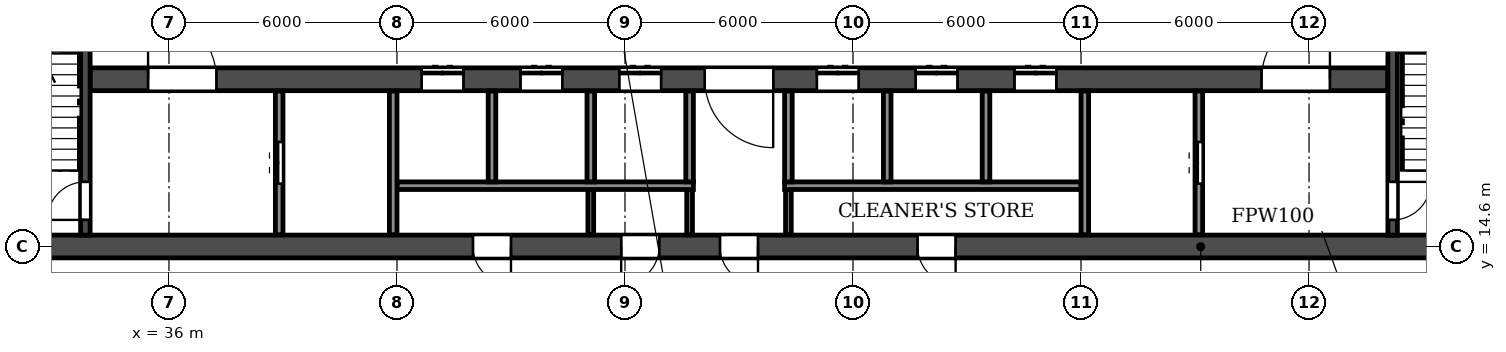
"""IFC4 building model, lengths in metres.
Left out: names, types, materials, properties, quantities, classifications, styles, units other than length and angle.
Written with IfcOpenShell. Run it as: python <this file> out.ifc"""

import sys

from ifc_helpers import new_model, si_unit, direction, frame, frame_2d, origin, place, context, subcontext, project, spatial, rectangle, extrude, element, fill, save


model = new_model("IFC4")
c1 = context("Model", 3, precision=1e-05, world=origin(), true_north=direction((0.0, 1.0)))
c2 = subcontext(c1, "Body", "Model", "MODEL_VIEW")
j1 = project(units=[si_unit("LENGTHUNIT", "METRE"), si_unit("PLANEANGLEUNIT", "RADIAN")], contexts=[c1])
p1 = place(None, origin())
s1 = spatial("IfcSite", under=j1, at=p1, CompositionType="ELEMENT")
p2 = place(p1, origin())
s2 = spatial("IfcBuilding", under=s1, at=p2, CompositionType="ELEMENT")
p3 = place(p2, frame((0.0, 0.0, 56.4)))
s3 = spatial("IfcBuildingStorey", under=s2, at=p3, CompositionType="ELEMENT", Elevation=56.4)
p4 = place(p3, frame((8.6, 14.6, 0.0), z_axis=(0.0, 0.0, 1.0), x_axis=(1.0, 0.0, 0.0)))
e1 = element("IfcWall", 1, at=p4, inside=s3, PredefinedType="SOLIDWALL", context=c2, shape_type="SweptSolid", body=[
    extrude(rectangle(XDim=84.8, YDim=0.6, at=frame_2d((42.4, 0.0))), origin(), (0.0, 0.0, 1.0), 3.05),
])
p5 = place(p4, frame((1.35, 0.0, 0.0)))
e2 = element("IfcOpeningElement", 2, at=p5, cuts=e1, PredefinedType="OPENING", context=c2, shape_type="SweptSolid", body=[
    extrude(rectangle(XDim=1.0, YDim=2.1, at=frame_2d((0.5, 1.05))), frame((0.0, 0.31, 0.0), z_axis=(0.0, -1.0, 0.0), x_axis=(1.0, 0.0, 0.0)), (0.0, 0.0, 1.0), 0.62),
])
p6 = place(p4, frame((6.05, 0.0, 0.0)))
e3 = element("IfcOpeningElement", 3, at=p6, cuts=e1, PredefinedType="OPENING", context=c2, shape_type="SweptSolid", body=[
    extrude(rectangle(XDim=1.0, YDim=2.1, at=frame_2d((0.5, 1.05))), frame((0.0, 0.31, 0.0), z_axis=(0.0, -1.0, 0.0), x_axis=(1.0, 0.0, 0.0)), (0.0, 0.0, 1.0), 0.62),
])
p7 = place(p4, frame((10.3, 0.0, 0.0)))
e4 = element("IfcOpeningElement", 4, at=p7, cuts=e1, PredefinedType="OPENING", context=c2, shape_type="SweptSolid", body=[
    extrude(rectangle(XDim=1.0, YDim=2.1, at=frame_2d((0.5, 1.05))), frame((0.0, 0.31, 0.0), z_axis=(0.0, -1.0, 0.0), x_axis=(1.0, 0.0, 0.0)), (0.0, 0.0, 1.0), 0.62),
])
p8 = place(p4, frame((18.2, 0.0, 0.0)))
e5 = element("IfcOpeningElement", 5, at=p8, cuts=e1, PredefinedType="OPENING", context=c2, shape_type="SweptSolid", body=[
    extrude(rectangle(XDim=1.0, YDim=2.1, at=frame_2d((0.5, 1.05))), frame((0.0, 0.31, 0.0), z_axis=(0.0, -1.0, 0.0), x_axis=(1.0, 0.0, 0.0)), (0.0, 0.0, 1.0), 0.62),
])
p9 = place(p4, frame((22.8, 0.0, 0.0)))
e6 = element("IfcOpeningElement", 6, at=p9, cuts=e1, PredefinedType="OPENING", context=c2, shape_type="SweptSolid", body=[
    extrude(rectangle(XDim=1.0, YDim=2.1, at=frame_2d((0.5, 1.05))), frame((0.0, 0.31, 0.0), z_axis=(0.0, -1.0, 0.0), x_axis=(1.0, 0.0, 0.0)), (0.0, 0.0, 1.0), 0.62),
])
p10 = place(p4, frame((35.4, 0.0, 0.0)))
e7 = element("IfcOpeningElement", 7, at=p10, cuts=e1, PredefinedType="OPENING", context=c2, shape_type="SweptSolid", body=[
    extrude(rectangle(XDim=1.0, YDim=2.1, at=frame_2d((0.5, 1.05))), frame((0.0, 0.31, 0.0), z_axis=(0.0, -1.0, 0.0), x_axis=(1.0, 0.0, 0.0)), (0.0, 0.0, 1.0), 0.62),
])
p11 = place(p4, frame((39.3, 0.0, 0.0)))
e8 = element("IfcOpeningElement", 8, at=p11, cuts=e1, PredefinedType="OPENING", context=c2, shape_type="SweptSolid", body=[
    extrude(rectangle(XDim=1.0, YDim=2.1, at=frame_2d((0.5, 1.05))), frame((0.0, 0.31, 0.0), z_axis=(0.0, -1.0, 0.0), x_axis=(1.0, 0.0, 0.0)), (0.0, 0.0, 1.0), 0.62),
])
p12 = place(p4, frame((41.9, 0.0, 0.0)))
e9 = element("IfcOpeningElement", 9, at=p12, cuts=e1, PredefinedType="OPENING", context=c2, shape_type="SweptSolid", body=[
    extrude(rectangle(XDim=1.0, YDim=2.1, at=frame_2d((0.5, 1.05))), frame((0.0, 0.31, 0.0), z_axis=(0.0, -1.0, 0.0), x_axis=(1.0, 0.0, 0.0)), (0.0, 0.0, 1.0), 0.62),
])
p13 = place(p4, frame((47.1, 0.0, 0.0)))
e10 = element("IfcOpeningElement", 10, at=p13, cuts=e1, PredefinedType="OPENING", context=c2, shape_type="SweptSolid", body=[
    extrude(rectangle(XDim=1.0, YDim=2.1, at=frame_2d((0.5, 1.05))), frame((0.0, 0.31, 0.0), z_axis=(0.0, -1.0, 0.0), x_axis=(1.0, 0.0, 0.0)), (0.0, 0.0, 1.0), 0.62),
])
p14 = place(p4, frame((61.0, 0.0, 0.0)))
e11 = element("IfcOpeningElement", 11, at=p14, cuts=e1, PredefinedType="OPENING", context=c2, shape_type="SweptSolid", body=[
    extrude(rectangle(XDim=1.0, YDim=2.1, at=frame_2d((0.5, 1.05))), frame((0.0, 0.31, 0.0), z_axis=(0.0, -1.0, 0.0), x_axis=(1.0, 0.0, 0.0)), (0.0, 0.0, 1.0), 0.62),
])
p15 = place(p4, frame((65.6, 0.0, 0.0)))
e12 = element("IfcOpeningElement", 12, at=p15, cuts=e1, PredefinedType="OPENING", context=c2, shape_type="SweptSolid", body=[
    extrude(rectangle(XDim=1.0, YDim=2.1, at=frame_2d((0.5, 1.05))), frame((0.0, 0.31, 0.0), z_axis=(0.0, -1.0, 0.0), x_axis=(1.0, 0.0, 0.0)), (0.0, 0.0, 1.0), 0.62),
])
p16 = place(p4, frame((73.5, 0.0, 0.0)))
e13 = element("IfcOpeningElement", 13, at=p16, cuts=e1, PredefinedType="OPENING", context=c2, shape_type="SweptSolid", body=[
    extrude(rectangle(XDim=1.0, YDim=2.1, at=frame_2d((0.5, 1.05))), frame((0.0, 0.31, 0.0), z_axis=(0.0, -1.0, 0.0), x_axis=(1.0, 0.0, 0.0)), (0.0, 0.0, 1.0), 0.62),
])
p17 = place(p4, frame((77.9, 0.0, 0.0)))
e14 = element("IfcOpeningElement", 14, at=p17, cuts=e1, PredefinedType="OPENING", context=c2, shape_type="SweptSolid", body=[
    extrude(rectangle(XDim=1.0, YDim=2.1, at=frame_2d((0.5, 1.05))), frame((0.0, 0.31, 0.0), z_axis=(0.0, -1.0, 0.0), x_axis=(1.0, 0.0, 0.0)), (0.0, 0.0, 1.0), 0.62),
])
p18 = place(p4, frame((82.6, 0.0, 0.0)))
e15 = element("IfcOpeningElement", 15, at=p18, cuts=e1, PredefinedType="OPENING", context=c2, shape_type="SweptSolid", body=[
    extrude(rectangle(XDim=1.0, YDim=2.1, at=frame_2d((0.5, 1.05))), frame((0.0, 0.31, 0.0), z_axis=(0.0, -1.0, 0.0), x_axis=(1.0, 0.0, 0.0)), (0.0, 0.0, 1.0), 0.62),
])
p19 = place(p3, frame((33.925, 19.0, 0.0), z_axis=(0.0, 0.0, 1.0), x_axis=(1.0, 0.0, 0.0)))
e16 = element("IfcWall", 16, at=p19, inside=s3, PredefinedType="SOLIDWALL", context=c2, shape_type="SweptSolid", body=[
    extrude(rectangle(XDim=34.15, YDim=0.6, at=frame_2d((17.075, 0.0))), origin(), (0.0, 0.0, 1.0), 3.05),
])
p20 = place(p19, frame((16.175, 0.0, 0.0)))
e17 = element("IfcOpeningElement", 17, at=p20, cuts=e16, PredefinedType="OPENING", context=c2, shape_type="SweptSolid", body=[
    extrude(rectangle(XDim=1.8, YDim=2.1, at=frame_2d((0.9, 1.05))), frame((0.0, 0.31, 0.0), z_axis=(0.0, -1.0, 0.0), x_axis=(1.0, 0.0, 0.0)), (0.0, 0.0, 1.0), 0.62),
])
p21 = place(p19, frame((1.525, 0.0, 0.0)))
e18 = element("IfcOpeningElement", 18, at=p21, cuts=e16, PredefinedType="OPENING", context=c2, shape_type="SweptSolid", body=[
    extrude(rectangle(XDim=1.8, YDim=2.1, at=frame_2d((0.9, 1.05))), frame((0.0, 0.31, 0.0), z_axis=(0.0, -1.0, 0.0), x_axis=(1.0, 0.0, 0.0)), (0.0, 0.0, 1.0), 0.62),
])
p22 = place(p19, frame((8.725, 0.0, 0.0)))
e19 = element("IfcOpeningElement", 19, at=p22, cuts=e16, PredefinedType="OPENING", context=c2, shape_type="SweptSolid", body=[
    extrude(rectangle(XDim=1.1, YDim=2.1, at=frame_2d((0.55, 1.05))), frame((0.0, 0.31, 0.0), z_axis=(0.0, -1.0, 0.0), x_axis=(1.0, 0.0, 0.0)), (0.0, 0.0, 1.0), 0.62),
])
p23 = place(p19, frame((11.325, 0.0, 0.0)))
e20 = element("IfcOpeningElement", 20, at=p23, cuts=e16, PredefinedType="OPENING", context=c2, shape_type="SweptSolid", body=[
    extrude(rectangle(XDim=1.1, YDim=2.1, at=frame_2d((0.55, 1.05))), frame((0.0, 0.31, 0.0), z_axis=(0.0, -1.0, 0.0), x_axis=(1.0, 0.0, 0.0)), (0.0, 0.0, 1.0), 0.62),
])
p24 = place(p19, frame((13.925, 0.0, 0.0)))
e21 = element("IfcOpeningElement", 21, at=p24, cuts=e16, PredefinedType="OPENING", context=c2, shape_type="SweptSolid", body=[
    extrude(rectangle(XDim=1.1, YDim=2.1, at=frame_2d((0.55, 1.05))), frame((0.0, 0.31, 0.0), z_axis=(0.0, -1.0, 0.0), x_axis=(1.0, 0.0, 0.0)), (0.0, 0.0, 1.0), 0.62),
])
p25 = place(p19, frame((19.125, 0.0, 0.0)))
e22 = element("IfcOpeningElement", 22, at=p25, cuts=e16, PredefinedType="OPENING", context=c2, shape_type="SweptSolid", body=[
    extrude(rectangle(XDim=1.1, YDim=2.1, at=frame_2d((0.55, 1.05))), frame((0.0, 0.31, 0.0), z_axis=(0.0, -1.0, 0.0), x_axis=(1.0, 0.0, 0.0)), (0.0, 0.0, 1.0), 0.62),
])
p26 = place(p19, frame((21.725, 0.0, 0.0)))
e23 = element("IfcOpeningElement", 23, at=p26, cuts=e16, PredefinedType="OPENING", context=c2, shape_type="SweptSolid", body=[
    extrude(rectangle(XDim=1.1, YDim=2.1, at=frame_2d((0.55, 1.05))), frame((0.0, 0.31, 0.0), z_axis=(0.0, -1.0, 0.0), x_axis=(1.0, 0.0, 0.0)), (0.0, 0.0, 1.0), 0.62),
])
p27 = place(p19, frame((24.325, 0.0, 0.0)))
e24 = element("IfcOpeningElement", 24, at=p27, cuts=e16, PredefinedType="OPENING", context=c2, shape_type="SweptSolid", body=[
    extrude(rectangle(XDim=1.1, YDim=2.1, at=frame_2d((0.55, 1.05))), frame((0.0, 0.31, 0.0), z_axis=(0.0, -1.0, 0.0), x_axis=(1.0, 0.0, 0.0)), (0.0, 0.0, 1.0), 0.62),
])
p28 = place(p19, frame((30.825, 0.0, 0.0)))
e25 = element("IfcOpeningElement", 25, at=p28, cuts=e16, PredefinedType="OPENING", context=c2, shape_type="SweptSolid", body=[
    extrude(rectangle(XDim=1.8, YDim=2.1, at=frame_2d((0.9, 1.05))), frame((0.0, 0.31, 0.0), z_axis=(0.0, -1.0, 0.0), x_axis=(1.0, 0.0, 0.0)), (0.0, 0.0, 1.0), 0.62),
])
p29 = place(p3, frame((33.8, 14.9, 0.0), z_axis=(0.0, 0.0, 1.0), x_axis=(0.0, 1.0, 0.0)))
e26 = element("IfcWall", 26, at=p29, inside=s3, PredefinedType="SOLIDWALL", context=c2, shape_type="SweptSolid", body=[
    extrude(rectangle(XDim=7.575, YDim=0.25, at=frame_2d((3.788, 0.0))), origin(), (0.0, 0.0, 1.0), 3.05),
])
p30 = place(p29, frame((0.4, 0.0, 0.0)))
e27 = element("IfcOpeningElement", 27, at=p30, cuts=e26, PredefinedType="OPENING", context=c2, shape_type="SweptSolid", body=[
    extrude(rectangle(XDim=1.0, YDim=2.1, at=frame_2d((0.5, 1.05))), frame((0.0, 0.135, 0.0), z_axis=(0.0, -1.0, 0.0), x_axis=(1.0, 0.0, 0.0)), (0.0, 0.0, 1.0), 0.27),
])
p31 = place(p3, frame((68.2, 14.9, 0.0), z_axis=(0.0, 0.0, 1.0), x_axis=(0.0, 1.0, 0.0)))
e28 = element("IfcWall", 28, at=p31, inside=s3, PredefinedType="SOLIDWALL", context=c2, shape_type="SweptSolid", body=[
    extrude(rectangle(XDim=7.575, YDim=0.25, at=frame_2d((3.788, 0.0))), origin(), (0.0, 0.0, 1.0), 3.05),
])
p32 = place(p31, frame((0.4, 0.0, 0.0)))
e29 = element("IfcOpeningElement", 29, at=p32, cuts=e28, PredefinedType="OPENING", context=c2, shape_type="SweptSolid", body=[
    extrude(rectangle(XDim=1.0, YDim=2.1, at=frame_2d((0.5, 1.05))), frame((0.0, 0.135, 0.0), z_axis=(0.0, -1.0, 0.0), x_axis=(1.0, 0.0, 0.0)), (0.0, 0.0, 1.0), 0.27),
])
for number, where, z_axis, x_axis in (
    (30, (49.7, 14.91, 0.0), (0.0, 0.0, 1.0), (0.0, 1.0, 0.0)),
    (31, (52.3, 14.91, 0.0), (0.0, 0.0, 1.0), (0.0, 1.0, 0.0)),
    (32, (47.1, 14.91, 0.0), (0.0, 0.0, 1.0), (0.0, 1.0, 0.0)),
):
    element("IfcWall", number, at=place(p3, frame(where, z_axis=z_axis, x_axis=x_axis)), inside=s3, PredefinedType="PARTITIONING", context=c2, shape_type="SweptSolid", body=[
        extrude(rectangle(XDim=1.19, YDim=0.15, at=frame_2d((0.595, 0.0))), origin(), (0.0, 0.0, 1.0), 3.05),
    ])
for number, where, z_axis, x_axis in (
    (33, (42.0, 16.2, 0.0), (0.0, 0.0, 1.0), (1.0, 0.0, 0.0)),
    (34, (52.2, 16.2, 0.0), (0.0, 0.0, 1.0), (1.0, 0.0, 0.0)),
):
    element("IfcWall", number, at=place(p3, frame(where, z_axis=z_axis, x_axis=x_axis)), inside=s3, PredefinedType="PARTITIONING", context=c2, shape_type="SweptSolid", body=[
        extrude(rectangle(XDim=7.8, YDim=0.2, at=frame_2d((3.9, 0.0))), origin(), (0.0, 0.0, 1.0), 3.05),
    ])
p33 = place(p3, frame((38.9, 14.91, 0.0), z_axis=(0.0, 0.0, 1.0), x_axis=(0.0, 1.0, 0.0)))
e35 = element("IfcWall", 35, at=p33, inside=s3, PredefinedType="PARTITIONING", context=c2, shape_type="SweptSolid", body=[
    extrude(rectangle(XDim=3.78, YDim=0.2, at=frame_2d((1.89, 0.0))), origin(), (0.0, 0.0, 1.0), 3.05),
])
p34 = place(p33, frame((1.34, 0.0, 0.0)))
e36 = element("IfcOpeningElement", 36, at=p34, cuts=e35, PredefinedType="OPENING", context=c2, shape_type="SweptSolid", body=[
    extrude(rectangle(XDim=1.1, YDim=2.1, at=frame_2d((0.55, 1.05))), frame((0.0, 0.11, 0.0), z_axis=(0.0, -1.0, 0.0), x_axis=(1.0, 0.0, 0.0)), (0.0, 0.0, 1.0), 0.22),
])
p35 = place(p3, frame((41.9, 14.91, 0.0), z_axis=(0.0, 0.0, 1.0), x_axis=(0.0, 1.0, 0.0)))
e37 = element("IfcWall", 37, at=p35, inside=s3, PredefinedType="PARTITIONING", context=c2, shape_type="SweptSolid", body=[
    extrude(rectangle(XDim=3.78, YDim=0.2, at=frame_2d((1.89, 0.0))), origin(), (0.0, 0.0, 1.0), 3.05),
])
for number, where, z_axis, x_axis in (
    (38, (44.5, 16.3, 0.0), (0.0, 0.0, 1.0), (0.0, 1.0, 0.0)),
    (39, (47.1, 16.3, 0.0), (0.0, 0.0, 1.0), (0.0, 1.0, 0.0)),
    (40, (49.7, 16.3, 0.0), (0.0, 0.0, 1.0), (0.0, 1.0, 0.0)),
    (41, (52.3, 16.3, 0.0), (0.0, 0.0, 1.0), (0.0, 1.0, 0.0)),
    (42, (54.9, 16.3, 0.0), (0.0, 0.0, 1.0), (0.0, 1.0, 0.0)),
    (43, (57.5, 16.3, 0.0), (0.0, 0.0, 1.0), (0.0, 1.0, 0.0)),
):
    element("IfcWall", number, at=place(p3, frame(where, z_axis=z_axis, x_axis=x_axis)), inside=s3, PredefinedType="PARTITIONING", context=c2, shape_type="SweptSolid", body=[
        extrude(rectangle(XDim=2.39, YDim=0.2, at=frame_2d((1.195, 0.0))), origin(), (0.0, 0.0, 1.0), 3.05),
    ])
p36 = place(p3, frame((60.1, 14.91, 0.0), z_axis=(0.0, 0.0, 1.0), x_axis=(0.0, 1.0, 0.0)))
e44 = element("IfcWall", 44, at=p36, inside=s3, PredefinedType="PARTITIONING", context=c2, shape_type="SweptSolid", body=[
    extrude(rectangle(XDim=3.78, YDim=0.2, at=frame_2d((1.89, 0.0))), origin(), (0.0, 0.0, 1.0), 3.05),
])
p37 = place(p3, frame((63.1, 14.91, 0.0), z_axis=(0.0, 0.0, 1.0), x_axis=(0.0, 1.0, 0.0)))
e45 = element("IfcWall", 45, at=p37, inside=s3, PredefinedType="PARTITIONING", context=c2, shape_type="SweptSolid", body=[
    extrude(rectangle(XDim=3.78, YDim=0.2, at=frame_2d((1.89, 0.0))), origin(), (0.0, 0.0, 1.0), 3.05),
])
p38 = place(p37, frame((1.34, 0.0, 0.0)))
e46 = element("IfcOpeningElement", 46, at=p38, cuts=e45, PredefinedType="OPENING", context=c2, shape_type="SweptSolid", body=[
    extrude(rectangle(XDim=1.1, YDim=2.1, at=frame_2d((0.55, 1.05))), frame((0.0, 0.11, 0.0), z_axis=(0.0, -1.0, 0.0), x_axis=(1.0, 0.0, 0.0)), (0.0, 0.0, 1.0), 0.22),
])
p39 = place(p10, frame((1.0, 0.0, 0.0), z_axis=(0.0, 0.0, 1.0), x_axis=(-1.0, 0.0, 0.0)))
e47 = element("IfcDoor", 47, at=p39, inside=s3, OperationType="SINGLE_SWING_LEFT", PredefinedType="DOOR", context=c2, shape_type="SweptSolid", body=[
    extrude(rectangle(XDim=1.0, YDim=2.1, at=frame_2d((0.5, 1.05))), frame((0.0, 0.025, 0.0), z_axis=(0.0, -1.0, 0.0), x_axis=(1.0, 0.0, 0.0)), (0.0, 0.0, 1.0), 0.05),
])
fill(e7, e47)
p40 = place(p11, frame((1.0, 0.0, 0.0), z_axis=(0.0, 0.0, 1.0), x_axis=(-1.0, 0.0, 0.0)))
e48 = element("IfcDoor", 48, at=p40, inside=s3, OperationType="SINGLE_SWING_RIGHT", PredefinedType="DOOR", context=c2, shape_type="SweptSolid", body=[
    extrude(rectangle(XDim=1.0, YDim=2.1, at=frame_2d((0.5, 1.05))), frame((0.0, 0.025, 0.0), z_axis=(0.0, -1.0, 0.0), x_axis=(1.0, 0.0, 0.0)), (0.0, 0.0, 1.0), 0.05),
])
fill(e8, e48)
p41 = place(p12, frame((1.0, 0.0, 0.0), z_axis=(0.0, 0.0, 1.0), x_axis=(-1.0, 0.0, 0.0)))
e49 = element("IfcDoor", 49, at=p41, inside=s3, OperationType="SINGLE_SWING_LEFT", PredefinedType="DOOR", context=c2, shape_type="SweptSolid", body=[
    extrude(rectangle(XDim=1.0, YDim=2.1, at=frame_2d((0.5, 1.05))), frame((0.0, 0.025, 0.0), z_axis=(0.0, -1.0, 0.0), x_axis=(1.0, 0.0, 0.0)), (0.0, 0.0, 1.0), 0.05),
])
fill(e9, e49)
p42 = place(p13, frame((1.0, 0.0, 0.0), z_axis=(0.0, 0.0, 1.0), x_axis=(-1.0, 0.0, 0.0)))
e50 = element("IfcDoor", 50, at=p42, inside=s3, OperationType="SINGLE_SWING_LEFT", PredefinedType="DOOR", context=c2, shape_type="SweptSolid", body=[
    extrude(rectangle(XDim=1.0, YDim=2.1, at=frame_2d((0.5, 1.05))), frame((0.0, 0.025, 0.0), z_axis=(0.0, -1.0, 0.0), x_axis=(1.0, 0.0, 0.0)), (0.0, 0.0, 1.0), 0.05),
])
fill(e10, e50)
p43 = place(p38, origin())
e51 = element("IfcDoor", 51, at=p43, inside=s3, OperationType="DOUBLE_DOOR_SLIDING", PredefinedType="DOOR", context=c2, shape_type="SweptSolid", body=[
    extrude(rectangle(XDim=1.1, YDim=2.1, at=frame_2d((0.55, 1.05))), frame((0.0, 0.025, 0.0), z_axis=(0.0, -1.0, 0.0), x_axis=(1.0, 0.0, 0.0)), (0.0, 0.0, 1.0), 0.05),
])
fill(e46, e51)
p44 = place(p32, frame((1.0, 0.0, 0.0), z_axis=(0.0, 0.0, 1.0), x_axis=(-1.0, 0.0, 0.0)))
e52 = element("IfcDoor", 52, at=p44, inside=s3, OperationType="SINGLE_SWING_LEFT", PredefinedType="DOOR", context=c2, shape_type="SweptSolid", body=[
    extrude(rectangle(XDim=1.0, YDim=2.1, at=frame_2d((0.5, 1.05))), frame((0.0, 0.025, 0.0), z_axis=(0.0, -1.0, 0.0), x_axis=(1.0, 0.0, 0.0)), (0.0, 0.0, 1.0), 0.05),
])
fill(e29, e52)
p45 = place(p30, origin())
e53 = element("IfcDoor", 53, at=p45, inside=s3, OperationType="SINGLE_SWING_LEFT", PredefinedType="DOOR", context=c2, shape_type="SweptSolid", body=[
    extrude(rectangle(XDim=1.0, YDim=2.1, at=frame_2d((0.5, 1.05))), frame((0.0, 0.025, 0.0), z_axis=(0.0, -1.0, 0.0), x_axis=(1.0, 0.0, 0.0)), (0.0, 0.0, 1.0), 0.05),
])
fill(e27, e53)
p46 = place(p34, origin())
e54 = element("IfcDoor", 54, at=p46, inside=s3, OperationType="DOUBLE_DOOR_SLIDING", PredefinedType="DOOR", context=c2, shape_type="SweptSolid", body=[
    extrude(rectangle(XDim=1.1, YDim=2.1, at=frame_2d((0.55, 1.05))), frame((0.0, 0.025, 0.0), z_axis=(0.0, -1.0, 0.0), x_axis=(1.0, 0.0, 0.0)), (0.0, 0.0, 1.0), 0.05),
])
fill(e36, e54)
p47 = place(p20, frame((1.8, 0.0, 0.0), z_axis=(0.0, 0.0, 1.0), x_axis=(-1.0, 0.0, 0.0)))
e55 = element("IfcDoor", 55, at=p47, inside=s3, OperationType="DOUBLE_DOOR_SINGLE_SWING", PredefinedType="DOOR", context=c2, shape_type="SweptSolid", body=[
    extrude(rectangle(XDim=1.8, YDim=2.1, at=frame_2d((0.9, 1.05))), frame((0.0, 0.025, 0.0), z_axis=(0.0, -1.0, 0.0), x_axis=(1.0, 0.0, 0.0)), (0.0, 0.0, 1.0), 0.05),
])
fill(e17, e55)
p48 = place(p21, origin())
e56 = element("IfcDoor", 56, at=p48, inside=s3, OperationType="DOUBLE_DOOR_SINGLE_SWING", PredefinedType="DOOR", context=c2, shape_type="SweptSolid", body=[
    extrude(rectangle(XDim=1.8, YDim=2.1, at=frame_2d((0.9, 1.05))), frame((0.0, 0.025, 0.0), z_axis=(0.0, -1.0, 0.0), x_axis=(1.0, 0.0, 0.0)), (0.0, 0.0, 1.0), 0.05),
])
fill(e18, e56)
p49 = place(p22, origin())
e57 = element("IfcDoor", 57, at=p49, inside=s3, OperationType="DOUBLE_DOOR_SLIDING", PredefinedType="DOOR", context=c2, shape_type="SweptSolid", body=[
    extrude(rectangle(XDim=1.1, YDim=2.1, at=frame_2d((0.55, 1.05))), frame((0.0, 0.025, 0.0), z_axis=(0.0, -1.0, 0.0), x_axis=(1.0, 0.0, 0.0)), (0.0, 0.0, 1.0), 0.05),
])
fill(e19, e57)
p50 = place(p23, origin())
e58 = element("IfcDoor", 58, at=p50, inside=s3, OperationType="DOUBLE_DOOR_SLIDING", PredefinedType="DOOR", context=c2, shape_type="SweptSolid", body=[
    extrude(rectangle(XDim=1.1, YDim=2.1, at=frame_2d((0.55, 1.05))), frame((0.0, 0.025, 0.0), z_axis=(0.0, -1.0, 0.0), x_axis=(1.0, 0.0, 0.0)), (0.0, 0.0, 1.0), 0.05),
])
fill(e20, e58)
p51 = place(p24, origin())
e59 = element("IfcDoor", 59, at=p51, inside=s3, OperationType="DOUBLE_DOOR_SLIDING", PredefinedType="DOOR", context=c2, shape_type="SweptSolid", body=[
    extrude(rectangle(XDim=1.1, YDim=2.1, at=frame_2d((0.55, 1.05))), frame((0.0, 0.025, 0.0), z_axis=(0.0, -1.0, 0.0), x_axis=(1.0, 0.0, 0.0)), (0.0, 0.0, 1.0), 0.05),
])
fill(e21, e59)
p52 = place(p25, origin())
e60 = element("IfcDoor", 60, at=p52, inside=s3, OperationType="DOUBLE_DOOR_SLIDING", PredefinedType="DOOR", context=c2, shape_type="SweptSolid", body=[
    extrude(rectangle(XDim=1.1, YDim=2.1, at=frame_2d((0.55, 1.05))), frame((0.0, 0.025, 0.0), z_axis=(0.0, -1.0, 0.0), x_axis=(1.0, 0.0, 0.0)), (0.0, 0.0, 1.0), 0.05),
])
fill(e22, e60)
p53 = place(p26, origin())
e61 = element("IfcDoor", 61, at=p53, inside=s3, OperationType="DOUBLE_DOOR_SLIDING", PredefinedType="DOOR", context=c2, shape_type="SweptSolid", body=[
    extrude(rectangle(XDim=1.1, YDim=2.1, at=frame_2d((0.55, 1.05))), frame((0.0, 0.025, 0.0), z_axis=(0.0, -1.0, 0.0), x_axis=(1.0, 0.0, 0.0)), (0.0, 0.0, 1.0), 0.05),
])
fill(e23, e61)
p54 = place(p27, origin())
e62 = element("IfcDoor", 62, at=p54, inside=s3, OperationType="DOUBLE_DOOR_SLIDING", PredefinedType="DOOR", context=c2, shape_type="SweptSolid", body=[
    extrude(rectangle(XDim=1.1, YDim=2.1, at=frame_2d((0.55, 1.05))), frame((0.0, 0.025, 0.0), z_axis=(0.0, -1.0, 0.0), x_axis=(1.0, 0.0, 0.0)), (0.0, 0.0, 1.0), 0.05),
])
fill(e24, e62)
p55 = place(p28, origin())
e63 = element("IfcDoor", 63, at=p55, inside=s3, OperationType="DOUBLE_DOOR_SINGLE_SWING", PredefinedType="DOOR", context=c2, shape_type="SweptSolid", body=[
    extrude(rectangle(XDim=1.8, YDim=2.1, at=frame_2d((0.9, 1.05))), frame((0.0, 0.025, 0.0), z_axis=(0.0, -1.0, 0.0), x_axis=(1.0, 0.0, 0.0)), (0.0, 0.0, 1.0), 0.05),
])
fill(e25, e63)
save(model, sys.argv[1])
